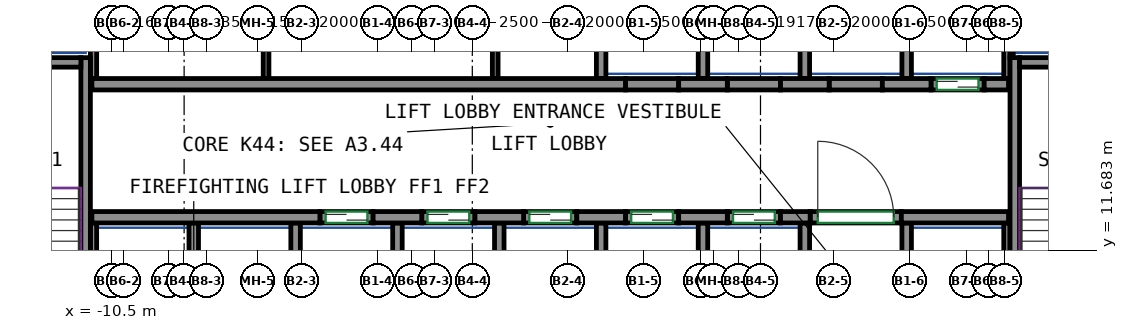
"""IFC4 building model, lengths in metres.
Left out: names, types, materials, properties, quantities, classifications, styles, units other than length and angle.
Written with IfcOpenShell. Run it as: python <this file> out.ifc"""

import sys

from ifc_helpers import new_model, si_unit, direction, frame, frame_2d, origin, place, context, subcontext, project, spatial, rectangle, extrude, source, transform, mapped, element, fill, save


model = new_model("IFC4")
c1 = context("Model", 3, precision=1e-05, world=origin(), true_north=direction((0.0, 1.0)))
c2 = subcontext(c1, "Body", "Model", "MODEL_VIEW")
j1 = project(units=[si_unit("LENGTHUNIT", "METRE"), si_unit("PLANEANGLEUNIT", "RADIAN")], contexts=[c1])
p1 = place(None, origin())
s1 = spatial("IfcSite", under=j1, at=p1, CompositionType="ELEMENT")
p2 = place(p1, origin())
s2 = spatial("IfcBuilding", under=s1, at=p2, CompositionType="ELEMENT")
p3 = place(p2, frame((0.0, 0.0, 182.1)))
s3 = spatial("IfcBuildingStorey", under=s2, at=p3, CompositionType="ELEMENT", Elevation=182.1)
m1 = source(origin(), c2, "Body", "SweptSolid", [
    extrude(rectangle(XDim=7.75, YDim=0.25, at=frame_2d((3.875, 0.0))), origin(), (0.0, 0.0, 1.0), 3.12),
])
p4 = place(p3, frame((-11.175, 9.0, 0.0), z_axis=(0.0, 0.0, 1.0), x_axis=(0.0, 1.0, 0.0)))
e1 = element("IfcWall", 1, at=p4, inside=s3, PredefinedType="SHEAR", context=c2, shape_type="MappedRepresentation", body=[
    mapped(m1, transform((0.0, 0.0, 0.0))),
])
m2 = source(origin(), c2, "Body", "SweptSolid", [
    extrude(rectangle(XDim=3.7, YDim=0.25, at=frame_2d((1.85, 0.0))), origin(), (0.0, 0.0, 1.0), 3.12),
])
p5 = place(p3, frame((-15.0, 16.625, 0.0), z_axis=(0.0, 0.0, 1.0), x_axis=(1.0, 0.0, 0.0)))
e2 = element("IfcWall", 2, at=p5, inside=s3, PredefinedType="SHEAR", context=c2, shape_type="MappedRepresentation", body=[
    mapped(m2, transform((0.0, 0.0, 0.0))),
])
p6 = place(p3, frame((13.275, 9.0, 0.0), z_axis=(0.0, 0.0, 1.0), x_axis=(0.0, 1.0, 0.0)))
e3 = element("IfcWall", 3, at=p6, inside=s3, PredefinedType="SHEAR", context=c2, shape_type="MappedRepresentation", body=[
    mapped(m1, transform((0.0, 0.0, 0.0))),
])
m3 = source(origin(), c2, "Body", "SweptSolid", [
    extrude(rectangle(XDim=3.7, YDim=0.25, at=frame_2d((1.85, 0.0))), origin(), (0.0, 0.0, 1.0), 3.12),
])
p7 = place(p3, frame((13.4, 16.625, 0.0), z_axis=(0.0, 0.0, 1.0), x_axis=(1.0, 0.0, 0.0)))
e4 = element("IfcWall", 4, at=p7, inside=s3, PredefinedType="SHEAR", context=c2, shape_type="MappedRepresentation", body=[
    mapped(m3, transform((0.0, 0.0, 0.0))),
])
m4 = source(origin(), c2, "Body", "SweptSolid", [
    extrude(rectangle(XDim=6.0, YDim=0.3, at=frame_2d((3.0, 0.0))), origin(), (0.0, 0.0, 1.0), 3.12),
])
p8 = place(p3, frame((-11.01, 12.55, 0.0), z_axis=(0.0, 0.0, 1.0), x_axis=(1.0, 0.0, 0.0)))
e5 = element("IfcWall", 5, at=p8, inside=s3, PredefinedType="SHEAR", context=c2, shape_type="MappedRepresentation", body=[
    mapped(m4, transform((0.0, 0.0, 0.0))),
])
m5 = source(origin(), c2, "Body", "SweptSolid", [
    extrude(rectangle(XDim=1.28, YDim=0.3, at=frame_2d((0.64, 0.0))), origin(), (0.0, 0.0, 1.0), 3.12),
])
for number, where, z_axis, x_axis in (
    (6, (-3.61, 12.55, 0.0), (0.0, 0.0, 1.0), (1.0, 0.0, 0.0)),
    (7, (-0.93, 12.55, 0.0), (0.0, 0.0, 1.0), (1.0, 0.0, 0.0)),
    (8, (1.75, 12.55, 0.0), (0.0, 0.0, 1.0), (1.0, 0.0, 0.0)),
    (9, (4.43, 12.55, 0.0), (0.0, 0.0, 1.0), (1.0, 0.0, 0.0)),
):
    element("IfcWall", number, at=place(p3, frame(where, z_axis=z_axis, x_axis=x_axis)), inside=s3, PredefinedType="SHEAR", context=c2, shape_type="MappedRepresentation", body=[
        mapped(m5, transform((0.0, 0.0, 0.0))),
    ])
m6 = source(origin(), c2, "Body", "SweptSolid", [
    extrude(rectangle(XDim=0.78, YDim=0.3, at=frame_2d((0.39, 0.0))), origin(), (0.0, 0.0, 1.0), 3.12),
])
p9 = place(p3, frame((7.11, 12.55, 0.0), z_axis=(0.0, 0.0, 1.0), x_axis=(1.0, 0.0, 0.0)))
e10 = element("IfcWall", 10, at=p9, inside=s3, PredefinedType="SHEAR", context=c2, shape_type="MappedRepresentation", body=[
    mapped(m6, transform((0.0, 0.0, 0.0))),
])
m7 = source(origin(), c2, "Body", "SweptSolid", [
    extrude(rectangle(XDim=2.82, YDim=0.3, at=frame_2d((1.41, 0.0))), origin(), (0.0, 0.0, 1.0), 3.12),
])
p10 = place(p3, frame((10.29, 12.55, 0.0), z_axis=(0.0, 0.0, 1.0), x_axis=(1.0, 0.0, 0.0)))
e11 = element("IfcWall", 11, at=p10, inside=s3, PredefinedType="SHEAR", context=c2, shape_type="MappedRepresentation", body=[
    mapped(m7, transform((0.0, 0.0, 0.0))),
])
m8 = source(origin(), c2, "Body", "SweptSolid", [
    extrude(rectangle(XDim=14.04, YDim=0.3, at=frame_2d((7.02, 0.0))), origin(), (0.0, 0.0, 1.0), 3.12),
])
p11 = place(p3, frame((-11.01, 16.05, 0.0), z_axis=(0.0, 0.0, 1.0), x_axis=(1.0, 0.0, 0.0)))
e12 = element("IfcWall", 12, at=p11, inside=s3, PredefinedType="SHEAR", context=c2, shape_type="MappedRepresentation", body=[
    mapped(m8, transform((0.0, 0.0, 0.0))),
])
p12 = place(p3, frame((4.43, 16.05, 0.0), z_axis=(0.0, 0.0, 1.0), x_axis=(1.0, 0.0, 0.0)))
e13 = element("IfcWall", 13, at=p12, inside=s3, PredefinedType="SHEAR", context=c2, shape_type="MappedRepresentation", body=[
    mapped(m5, transform((0.0, 0.0, 0.0))),
])
m9 = source(origin(), c2, "Body", "SweptSolid", [
    extrude(rectangle(XDim=1.28, YDim=0.3, at=frame_2d((0.64, 0.0))), origin(), (0.0, 0.0, 1.0), 3.12),
])
p13 = place(p3, frame((7.11, 16.05, 0.0), z_axis=(0.0, 0.0, 1.0), x_axis=(1.0, 0.0, 0.0)))
e14 = element("IfcWall", 14, at=p13, inside=s3, PredefinedType="SHEAR", context=c2, shape_type="MappedRepresentation", body=[
    mapped(m9, transform((0.0, 0.0, 0.0))),
])
p14 = place(p3, frame((9.79, 16.05, 0.0), z_axis=(0.0, 0.0, 1.0), x_axis=(1.0, 0.0, 0.0)))
e15 = element("IfcWall", 15, at=p14, inside=s3, PredefinedType="SHEAR", context=c2, shape_type="MappedRepresentation", body=[
    mapped(m5, transform((0.0, 0.0, 0.0))),
])
m10 = source(origin(), c2, "Body", "SweptSolid", [
    extrude(rectangle(XDim=0.64, YDim=0.3, at=frame_2d((0.32, 0.0))), origin(), (0.0, 0.0, 1.0), 3.12),
])
p15 = place(p3, frame((12.47, 16.05, 0.0), z_axis=(0.0, 0.0, 1.0), x_axis=(1.0, 0.0, 0.0)))
e16 = element("IfcWall", 16, at=p15, inside=s3, PredefinedType="SHEAR", context=c2, shape_type="MappedRepresentation", body=[
    mapped(m10, transform((0.0, 0.0, 0.0))),
])
m11 = source(origin(), c2, "Body", "SweptSolid", [
    extrude(rectangle(XDim=1.4, YDim=0.3, at=frame_2d((0.7, 0.0))), origin(), (0.0, 0.0, 1.0), 3.12),
])
p16 = place(p3, frame((-5.01, 12.55, 0.0), z_axis=(0.0, 0.0, 1.0), x_axis=(1.0, 0.0, 0.0)))
e17 = element("IfcWall", 17, at=p16, inside=s3, PredefinedType="PARTITIONING", context=c2, shape_type="MappedRepresentation", body=[
    mapped(m11, transform((0.0, 0.0, 0.0))),
])
p17 = place(p16, frame((0.15, 0.0, 0.0)))
e18 = element("IfcOpeningElement", 18, at=p17, cuts=e17, PredefinedType="OPENING", context=c2, shape_type="SweptSolid", body=[
    extrude(rectangle(XDim=1.1, YDim=2.1, at=frame_2d((0.55, 1.05))), frame((0.0, 0.16, 0.0), z_axis=(0.0, -1.0, 0.0), x_axis=(1.0, 0.0, 0.0)), (0.0, 0.0, 1.0), 0.32),
])
m12 = source(origin(), c2, "Body", "SweptSolid", [
    extrude(rectangle(XDim=1.4, YDim=0.3, at=frame_2d((0.7, 0.0))), origin(), (0.0, 0.0, 1.0), 3.12),
])
p18 = place(p3, frame((-2.33, 12.55, 0.0), z_axis=(0.0, 0.0, 1.0), x_axis=(1.0, 0.0, 0.0)))
e19 = element("IfcWall", 19, at=p18, inside=s3, PredefinedType="PARTITIONING", context=c2, shape_type="MappedRepresentation", body=[
    mapped(m12, transform((0.0, 0.0, 0.0))),
])
p19 = place(p18, frame((0.15, 0.0, 0.0)))
e20 = element("IfcOpeningElement", 20, at=p19, cuts=e19, PredefinedType="OPENING", context=c2, shape_type="SweptSolid", body=[
    extrude(rectangle(XDim=1.1, YDim=2.1, at=frame_2d((0.55, 1.05))), frame((0.0, 0.16, 0.0), z_axis=(0.0, -1.0, 0.0), x_axis=(1.0, 0.0, 0.0)), (0.0, 0.0, 1.0), 0.32),
])
p20 = place(p3, frame((0.35, 12.55, 0.0), z_axis=(0.0, 0.0, 1.0), x_axis=(1.0, 0.0, 0.0)))
e21 = element("IfcWall", 21, at=p20, inside=s3, PredefinedType="PARTITIONING", context=c2, shape_type="MappedRepresentation", body=[
    mapped(m11, transform((0.0, 0.0, 0.0))),
])
p21 = place(p20, frame((0.15, 0.0, 0.0)))
e22 = element("IfcOpeningElement", 22, at=p21, cuts=e21, PredefinedType="OPENING", context=c2, shape_type="SweptSolid", body=[
    extrude(rectangle(XDim=1.1, YDim=2.1, at=frame_2d((0.55, 1.05))), frame((0.0, 0.16, 0.0), z_axis=(0.0, -1.0, 0.0), x_axis=(1.0, 0.0, 0.0)), (0.0, 0.0, 1.0), 0.32),
])
p22 = place(p3, frame((3.03, 12.55, 0.0), z_axis=(0.0, 0.0, 1.0), x_axis=(1.0, 0.0, 0.0)))
e23 = element("IfcWall", 23, at=p22, inside=s3, PredefinedType="PARTITIONING", context=c2, shape_type="MappedRepresentation", body=[
    mapped(m11, transform((0.0, 0.0, 0.0))),
])
p23 = place(p22, frame((0.15, 0.0, 0.0)))
e24 = element("IfcOpeningElement", 24, at=p23, cuts=e23, PredefinedType="OPENING", context=c2, shape_type="SweptSolid", body=[
    extrude(rectangle(XDim=1.1, YDim=2.1, at=frame_2d((0.55, 1.05))), frame((0.0, 0.16, 0.0), z_axis=(0.0, -1.0, 0.0), x_axis=(1.0, 0.0, 0.0)), (0.0, 0.0, 1.0), 0.32),
])
p24 = place(p3, frame((5.71, 12.55, 0.0), z_axis=(0.0, 0.0, 1.0), x_axis=(1.0, 0.0, 0.0)))
e25 = element("IfcWall", 25, at=p24, inside=s3, PredefinedType="PARTITIONING", context=c2, shape_type="MappedRepresentation", body=[
    mapped(m12, transform((0.0, 0.0, 0.0))),
])
p25 = place(p24, frame((0.15, 0.0, 0.0)))
e26 = element("IfcOpeningElement", 26, at=p25, cuts=e25, PredefinedType="OPENING", context=c2, shape_type="SweptSolid", body=[
    extrude(rectangle(XDim=1.1, YDim=2.1, at=frame_2d((0.55, 1.05))), frame((0.0, 0.16, 0.0), z_axis=(0.0, -1.0, 0.0), x_axis=(1.0, 0.0, 0.0)), (0.0, 0.0, 1.0), 0.32),
])
p26 = place(p3, frame((11.07, 16.05, 0.0), z_axis=(0.0, 0.0, 1.0), x_axis=(1.0, 0.0, 0.0)))
e27 = element("IfcWall", 27, at=p26, inside=s3, PredefinedType="PARTITIONING", context=c2, shape_type="MappedRepresentation", body=[
    mapped(m11, transform((0.0, 0.0, 0.0))),
])
p27 = place(p26, frame((0.15, 0.0, 0.0)))
e28 = element("IfcOpeningElement", 28, at=p27, cuts=e27, PredefinedType="OPENING", context=c2, shape_type="SweptSolid", body=[
    extrude(rectangle(XDim=1.1, YDim=2.1, at=frame_2d((0.55, 1.05))), frame((0.0, 0.16, 0.0), z_axis=(0.0, -1.0, 0.0), x_axis=(1.0, 0.0, 0.0)), (0.0, 0.0, 1.0), 0.32),
])
m13 = source(origin(), c2, "Body", "SweptSolid", [
    extrude(rectangle(XDim=2.4, YDim=0.3, at=frame_2d((1.2, 0.0))), origin(), (0.0, 0.0, 1.0), 3.12),
])
p28 = place(p3, frame((7.89, 12.55, 0.0), z_axis=(0.0, 0.0, 1.0), x_axis=(1.0, 0.0, 0.0)))
e29 = element("IfcWall", 29, at=p28, inside=s3, PredefinedType="PARTITIONING", context=c2, shape_type="MappedRepresentation", body=[
    mapped(m13, transform((0.0, 0.0, 0.0))),
])
p29 = place(p28, frame((0.2, 0.0, 0.0)))
e30 = element("IfcOpeningElement", 30, at=p29, cuts=e29, PredefinedType="OPENING", context=c2, shape_type="SweptSolid", body=[
    extrude(rectangle(XDim=2.0, YDim=2.1, at=frame_2d((1.0, 1.05))), frame((0.0, 0.16, 0.0), z_axis=(0.0, -1.0, 0.0), x_axis=(1.0, 0.0, 0.0)), (0.0, 0.0, 1.0), 0.32),
])
p30 = place(p3, frame((3.03, 16.05, 0.0), z_axis=(0.0, 0.0, 1.0), x_axis=(1.0, 0.0, 0.0)))
e31 = element("IfcWall", 31, at=p30, inside=s3, PredefinedType="PARTITIONING", context=c2, shape_type="MappedRepresentation", body=[
    mapped(m11, transform((0.0, 0.0, 0.0))),
])
for number, where, z_axis, x_axis in (
    (32, (5.71, 16.05, 0.0), (0.0, 0.0, 1.0), (1.0, 0.0, 0.0)),
    (33, (8.39, 16.05, 0.0), (0.0, 0.0, 1.0), (1.0, 0.0, 0.0)),
):
    element("IfcWall", number, at=place(p3, frame(where, z_axis=z_axis, x_axis=x_axis)), inside=s3, PredefinedType="PARTITIONING", context=c2, shape_type="MappedRepresentation", body=[
        mapped(m12, transform((0.0, 0.0, 0.0))),
    ])
m14 = source(origin(), c2, "Body", "SweptSolid", [
    extrude(rectangle(XDim=3.275, YDim=0.165, at=frame_2d((1.638, 0.0))), origin(), (0.0, 0.0, 1.0), 3.12),
])
p31 = place(p3, frame((13.067, 16.2, 0.0), z_axis=(0.0, 0.0, 1.0), x_axis=(0.0, 1.0, 0.0)))
e34 = element("IfcWall", 34, at=p31, inside=s3, PredefinedType="PARTITIONING", context=c2, shape_type="MappedRepresentation", body=[
    mapped(m14, transform((0.0, 0.0, 0.0))),
])
m15 = source(origin(), c2, "Body", "SweptSolid", [
    extrude(rectangle(XDim=4.8, YDim=0.165, at=frame_2d((2.4, 0.0))), origin(), (0.0, 0.0, 1.0), 3.12),
])
p32 = place(p3, frame((-10.968, 16.2, 0.0), z_axis=(0.0, 0.0, 1.0), x_axis=(0.0, 1.0, 0.0)))
e35 = element("IfcWall", 35, at=p32, inside=s3, PredefinedType="PARTITIONING", context=c2, shape_type="MappedRepresentation", body=[
    mapped(m15, transform((0.0, 0.0, 0.0))),
])
m16 = source(origin(), c2, "Body", "SweptSolid", [
    extrude(rectangle(XDim=3.275, YDim=0.25, at=frame_2d((1.638, 0.0))), origin(), (0.0, 0.0, 1.0), 3.12),
])
p33 = place(p3, frame((10.43, 16.2, 0.0), z_axis=(0.0, 0.0, 1.0), x_axis=(0.0, 1.0, 0.0)))
e36 = element("IfcWall", 36, at=p33, inside=s3, PredefinedType="PARTITIONING", context=c2, shape_type="MappedRepresentation", body=[
    mapped(m16, transform((0.0, 0.0, 0.0))),
])
m17 = source(origin(), c2, "Body", "SweptSolid", [
    extrude(rectangle(XDim=2.725, YDim=0.085, at=frame_2d((1.363, 0.0))), origin(), (0.0, 0.0, 1.0), 3.12),
])
p34 = place(p3, frame((13.192, 16.75, 0.0), z_axis=(0.0, 0.0, 1.0), x_axis=(0.0, 1.0, 0.0)))
e37 = element("IfcWall", 37, at=p34, inside=s3, PredefinedType="PARTITIONING", context=c2, shape_type="MappedRepresentation", body=[
    mapped(m17, transform((0.0, 0.0, 0.0))),
])
for number, where, z_axis, x_axis in (
    (38, (2.39, 16.2, 0.0), (0.0, 0.0, 1.0), (0.0, 1.0, 0.0)),
    (39, (5.07, 16.2, 0.0), (0.0, 0.0, 1.0), (0.0, 1.0, 0.0)),
    (40, (7.75, 16.2, 0.0), (0.0, 0.0, 1.0), (0.0, 1.0, 0.0)),
):
    element("IfcWall", number, at=place(p3, frame(where, z_axis=z_axis, x_axis=x_axis)), inside=s3, PredefinedType="PARTITIONING", context=c2, shape_type="MappedRepresentation", body=[
        mapped(m16, transform((0.0, 0.0, 0.0))),
    ])
m18 = source(origin(), c2, "Body", "SweptSolid", [
    extrude(rectangle(XDim=3.4, YDim=0.25, at=frame_2d((1.7, 0.0))), origin(), (0.0, 0.0, 1.0), 3.12),
])
p35 = place(p3, frame((10.43, 9.0, 0.0), z_axis=(0.0, 0.0, 1.0), x_axis=(0.0, 1.0, 0.0)))
e41 = element("IfcWall", 41, at=p35, inside=s3, PredefinedType="PARTITIONING", context=c2, shape_type="MappedRepresentation", body=[
    mapped(m18, transform((0.0, 0.0, 0.0))),
])
m19 = source(origin(), c2, "Body", "SweptSolid", [
    extrude(rectangle(XDim=3.4, YDim=0.165, at=frame_2d((1.7, 0.0))), origin(), (0.0, 0.0, 1.0), 3.12),
])
p36 = place(p3, frame((13.067, 9.0, 0.0), z_axis=(0.0, 0.0, 1.0), x_axis=(0.0, 1.0, 0.0)))
e42 = element("IfcWall", 42, at=p36, inside=s3, PredefinedType="PARTITIONING", context=c2, shape_type="MappedRepresentation", body=[
    mapped(m19, transform((0.0, 0.0, 0.0))),
])
for number, where, z_axis, x_axis in (
    (43, (2.39, 9.0, 0.0), (0.0, 0.0, 1.0), (0.0, 1.0, 0.0)),
    (44, (5.07, 9.0, 0.0), (0.0, 0.0, 1.0), (0.0, 1.0, 0.0)),
    (45, (7.75, 9.0, 0.0), (0.0, 0.0, 1.0), (0.0, 1.0, 0.0)),
    (46, (-0.29, 9.0, 0.0), (0.0, 0.0, 1.0), (0.0, 1.0, 0.0)),
):
    element("IfcWall", number, at=place(p3, frame(where, z_axis=z_axis, x_axis=x_axis)), inside=s3, PredefinedType="PARTITIONING", context=c2, shape_type="MappedRepresentation", body=[
        mapped(m18, transform((0.0, 0.0, 0.0))),
    ])
p37 = place(p3, frame((-10.968, 9.0, 0.0), z_axis=(0.0, 0.0, 1.0), x_axis=(0.0, 1.0, 0.0)))
e47 = element("IfcWall", 47, at=p37, inside=s3, PredefinedType="PARTITIONING", context=c2, shape_type="MappedRepresentation", body=[
    mapped(m19, transform((0.0, 0.0, 0.0))),
])
for number, where, z_axis, x_axis in (
    (48, (-2.97, 9.0, 0.0), (0.0, 0.0, 1.0), (0.0, 1.0, 0.0)),
    (49, (-5.65, 9.0, 0.0), (0.0, 0.0, 1.0), (0.0, 1.0, 0.0)),
    (50, (-8.33, 9.0, 0.0), (0.0, 0.0, 1.0), (0.0, 1.0, 0.0)),
):
    element("IfcWall", number, at=place(p3, frame(where, z_axis=z_axis, x_axis=x_axis)), inside=s3, PredefinedType="PARTITIONING", context=c2, shape_type="MappedRepresentation", body=[
        mapped(m18, transform((0.0, 0.0, 0.0))),
    ])
m20 = source(origin(), c2, "Body", "SweptSolid", [
    extrude(rectangle(XDim=4.8, YDim=0.15, at=frame_2d((2.4, 0.0))), origin(), (0.0, 0.0, 1.0), 3.12),
])
for number, where, z_axis, x_axis in (
    (51, (-6.427, 16.2, 0.0), (0.0, 0.0, 1.0), (0.0, 1.0, 0.0)),
    (52, (-0.397, 16.2, 0.0), (0.0, 0.0, 1.0), (0.0, 1.0, 0.0)),
):
    element("IfcWall", number, at=place(p3, frame(where, z_axis=z_axis, x_axis=x_axis)), inside=s3, PredefinedType="PARTITIONING", context=c2, shape_type="MappedRepresentation", body=[
        mapped(m20, transform((0.0, 0.0, 0.0))),
    ])
p38 = place(p29, origin())
e53 = element("IfcDoor", 53, at=p38, inside=s3, OperationType="DOUBLE_DOOR_SINGLE_SWING", PredefinedType="DOOR", context=c2, shape_type="SweptSolid", body=[
    extrude(rectangle(XDim=2.0, YDim=2.1, at=frame_2d((1.0, 1.05))), frame((0.0, 0.025, 0.0), z_axis=(0.0, -1.0, 0.0), x_axis=(1.0, 0.0, 0.0)), (0.0, 0.0, 1.0), 0.05),
])
fill(e30, e53)
p39 = place(p17, origin())
e54 = element("IfcDoor", 54, at=p39, inside=s3, OperationType="DOUBLE_DOOR_SLIDING", PredefinedType="DOOR", context=c2, shape_type="SweptSolid", body=[
    extrude(rectangle(XDim=1.1, YDim=2.1, at=frame_2d((0.55, 1.05))), frame((0.0, 0.025, 0.0), z_axis=(0.0, -1.0, 0.0), x_axis=(1.0, 0.0, 0.0)), (0.0, 0.0, 1.0), 0.05),
])
fill(e18, e54)
p40 = place(p19, origin())
e55 = element("IfcDoor", 55, at=p40, inside=s3, OperationType="DOUBLE_DOOR_SLIDING", PredefinedType="DOOR", context=c2, shape_type="SweptSolid", body=[
    extrude(rectangle(XDim=1.1, YDim=2.1, at=frame_2d((0.55, 1.05))), frame((0.0, 0.025, 0.0), z_axis=(0.0, -1.0, 0.0), x_axis=(1.0, 0.0, 0.0)), (0.0, 0.0, 1.0), 0.05),
])
fill(e20, e55)
p41 = place(p21, origin())
e56 = element("IfcDoor", 56, at=p41, inside=s3, OperationType="DOUBLE_DOOR_SLIDING", PredefinedType="DOOR", context=c2, shape_type="SweptSolid", body=[
    extrude(rectangle(XDim=1.1, YDim=2.1, at=frame_2d((0.55, 1.05))), frame((0.0, 0.025, 0.0), z_axis=(0.0, -1.0, 0.0), x_axis=(1.0, 0.0, 0.0)), (0.0, 0.0, 1.0), 0.05),
])
fill(e22, e56)
p42 = place(p23, origin())
e57 = element("IfcDoor", 57, at=p42, inside=s3, OperationType="DOUBLE_DOOR_SLIDING", PredefinedType="DOOR", context=c2, shape_type="SweptSolid", body=[
    extrude(rectangle(XDim=1.1, YDim=2.1, at=frame_2d((0.55, 1.05))), frame((0.0, 0.025, 0.0), z_axis=(0.0, -1.0, 0.0), x_axis=(1.0, 0.0, 0.0)), (0.0, 0.0, 1.0), 0.05),
])
fill(e24, e57)
p43 = place(p25, origin())
e58 = element("IfcDoor", 58, at=p43, inside=s3, OperationType="DOUBLE_DOOR_SLIDING", PredefinedType="DOOR", context=c2, shape_type="SweptSolid", body=[
    extrude(rectangle(XDim=1.1, YDim=2.1, at=frame_2d((0.55, 1.05))), frame((0.0, 0.025, 0.0), z_axis=(0.0, -1.0, 0.0), x_axis=(1.0, 0.0, 0.0)), (0.0, 0.0, 1.0), 0.05),
])
fill(e26, e58)
p44 = place(p27, origin())
e59 = element("IfcDoor", 59, at=p44, inside=s3, OperationType="DOUBLE_DOOR_SLIDING", PredefinedType="DOOR", context=c2, shape_type="SweptSolid", body=[
    extrude(rectangle(XDim=1.1, YDim=2.1, at=frame_2d((0.55, 1.05))), frame((0.0, 0.025, 0.0), z_axis=(0.0, -1.0, 0.0), x_axis=(1.0, 0.0, 0.0)), (0.0, 0.0, 1.0), 0.05),
])
fill(e28, e59)
save(model, sys.argv[1])
